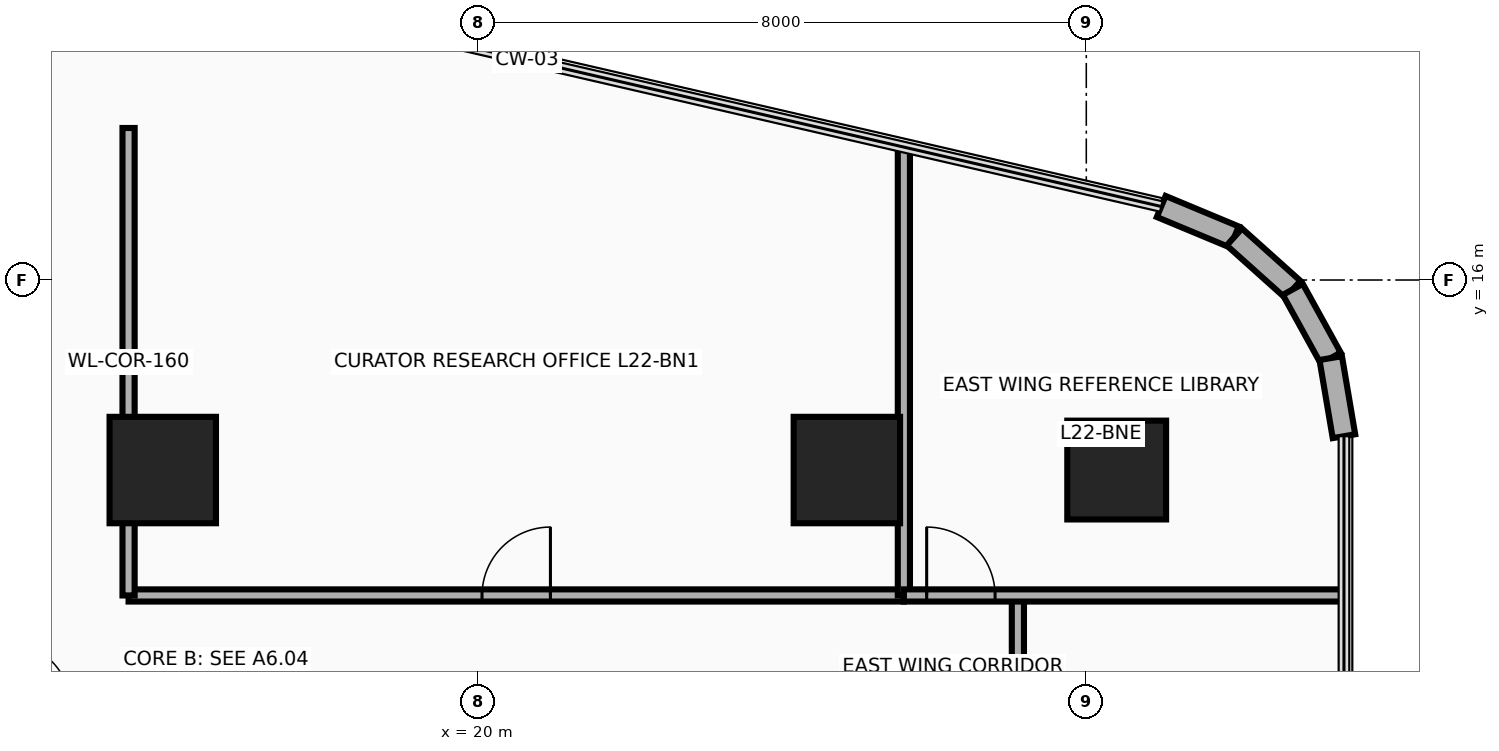
"""IFC4 building model, lengths in metres.
Left out: names, types, materials, properties, quantities, classifications, styles, units other than length and angle.
Written with IfcOpenShell. Run it as: python <this file> out.ifc"""

import sys

from ifc_helpers import new_model, si_unit, direction, frame, frame_2d, origin, origin_2d, place, context, subcontext, project, spatial, rectangle, circle, extrude, source, transform, mapped, element, fill, save


model = new_model("IFC4")
c1 = context("Model", 3, precision=1e-05, world=origin(), true_north=direction((0.0, 1.0)))
c2 = subcontext(c1, "Body", "Model", "MODEL_VIEW")
j1 = project(units=[si_unit("LENGTHUNIT", "METRE"), si_unit("PLANEANGLEUNIT", "RADIAN")], contexts=[c1])
p1 = place(None, origin())
s1 = spatial("IfcSite", under=j1, at=p1, CompositionType="ELEMENT")
p2 = place(p1, origin())
s2 = spatial("IfcBuilding", under=s1, at=p2, CompositionType="ELEMENT")
p3 = place(p2, frame((0.0, 0.0, 88.9)))
s3 = spatial("IfcBuildingStorey", under=s2, at=p3, CompositionType="ELEMENT", Elevation=88.9)
m1 = source(origin(), c2, "Body", "SweptSolid", [
    extrude(rectangle(XDim=1.4, YDim=1.4, at=origin_2d()), origin(), (0.0, 0.0, 1.0), 3.7),
])
for number, where, z_axis, x_axis in (
    (1, (15.85, 13.5, 0.0), (0.0, 0.0, 1.0), (1.0, 0.0, 0.0)),
    (2, (24.85, 13.5, 0.0), (0.0, 0.0, 1.0), (1.0, 0.0, 0.0)),
):
    element("IfcColumn", number, at=place(p3, frame(where, z_axis=z_axis, x_axis=x_axis)), inside=s3, PredefinedType="COLUMN", context=c2, shape_type="MappedRepresentation", body=[
        mapped(m1, transform((0.0, 0.0, 0.0), x_axis=(1.0, 0.0, 0.0), y_axis=(0.0, 1.0, 0.0), z_axis=(0.0, 0.0, 1.0), scale=1.0)),
    ])
m2 = source(origin(), c2, "Body", "SweptSolid", [
    extrude(circle(Radius=0.65, at=origin_2d()), origin(), (0.0, 0.0, 1.0), 3.7),
])
p4 = place(p3, frame((28.4, 13.5, 0.0), z_axis=(0.0, 0.0, 1.0), x_axis=(1.0, 0.0, 0.0)))
e3 = element("IfcColumn", 3, at=p4, inside=s3, PredefinedType="COLUMN", context=c2, shape_type="MappedRepresentation", body=[
    mapped(m2, transform((0.0, 0.0, 0.0), x_axis=(1.0, 0.0, 0.0), y_axis=(0.0, 1.0, 0.0), z_axis=(0.0, 0.0, 1.0), scale=1.0)),
])
p5 = place(p3, frame((28.986, 16.967, 0.0), z_axis=(0.0, 0.0, 1.0), x_axis=(0.923083852684, -0.384598753136, 0.0)))
e4 = element("IfcWall", 4, at=p5, inside=s3, PredefinedType="SOLIDWALL", context=c2, shape_type="SweptSolid", body=[
    extrude(rectangle(XDim=1.042, YDim=0.3, at=frame_2d((0.521, 0.0))), origin(), (0.0, 0.0, 1.0), 3.46),
])
p6 = place(p3, frame((29.948, 16.566, 0.0), z_axis=(0.0, 0.0, 1.0), x_axis=(0.744585645533, -0.66752694063, 0.0)))
e5 = element("IfcWall", 5, at=p6, inside=s3, PredefinedType="SOLIDWALL", context=c2, shape_type="SweptSolid", body=[
    extrude(rectangle(XDim=1.033, YDim=0.3, at=frame_2d((0.517, 0.0))), origin(), (0.0, 0.0, 1.0), 3.46),
])
p7 = place(p3, frame((30.717, 15.877, 0.0), z_axis=(0.0, 0.0, 1.0), x_axis=(0.482971098131, -0.875636293429, 0.0)))
e6 = element("IfcWall", 6, at=p7, inside=s3, PredefinedType="SOLIDWALL", context=c2, shape_type="SweptSolid", body=[
    extrude(rectangle(XDim=1.033, YDim=0.3, at=frame_2d((0.516, 0.0))), origin(), (0.0, 0.0, 1.0), 3.46),
])
p8 = place(p3, frame((31.216, 14.973, 0.0), z_axis=(0.0, 0.0, 1.0), x_axis=(0.167019462117, -0.985953598946, 0.0)))
e7 = element("IfcWall", 7, at=p8, inside=s3, PredefinedType="SOLIDWALL", context=c2, shape_type="SweptSolid", body=[
    extrude(rectangle(XDim=1.042, YDim=0.3, at=frame_2d((0.521, 0.0))), origin(), (0.0, 0.0, 1.0), 3.46),
])
p9 = place(p3, frame((15.4, 11.85, 0.0), z_axis=(0.0, 0.0, 1.0), x_axis=(1.0, 0.0, 0.0)))
e8 = element("IfcWall", 8, at=p9, inside=s3, PredefinedType="PARTITIONING", context=c2, shape_type="SweptSolid", body=[
    extrude(rectangle(XDim=10.2, YDim=0.16, at=frame_2d((5.1, 0.0))), origin(), (0.0, 0.0, 1.0), 2.834),
])
p10 = place(p9, frame((4.65, 0.0, 0.0)))
e9 = element("IfcOpeningElement", 9, at=p10, cuts=e8, PredefinedType="OPENING", context=c2, shape_type="SweptSolid", body=[
    extrude(rectangle(XDim=0.9, YDim=2.1, at=frame_2d((0.45, 1.05))), frame((0.0, 0.095, 0.0), z_axis=(0.0, -1.0, 0.0), x_axis=(1.0, 0.0, 0.0)), (0.0, 0.0, 1.0), 0.19),
])
p11 = place(p3, frame((15.4, 11.85, 0.0), z_axis=(0.0, 0.0, 1.0), x_axis=(0.0, 1.0, 0.0)))
e10 = element("IfcWall", 10, at=p11, inside=s3, PredefinedType="PARTITIONING", context=c2, shape_type="SweptSolid", body=[
    extrude(rectangle(XDim=6.15, YDim=0.16, at=frame_2d((3.075, 0.0))), origin(), (0.0, 0.0, 1.0), 2.583),
])
p12 = place(p3, frame((25.6, 11.85, 0.0), z_axis=(0.0, 0.0, 1.0), x_axis=(0.0, 1.0, 0.0)))
e11 = element("IfcWall", 11, at=p12, inside=s3, PredefinedType="PARTITIONING", context=c2, shape_type="SweptSolid", body=[
    extrude(rectangle(XDim=5.898, YDim=0.16, at=frame_2d((2.949, 0.0))), origin(), (0.0, 0.0, 1.0), 2.583),
])
p13 = place(p3, frame((27.1, -13.89, 0.0), z_axis=(0.0, 0.0, 1.0), x_axis=(0.0, 1.0, 0.0)))
e12 = element("IfcWall", 12, at=p13, inside=s3, PredefinedType="PARTITIONING", context=c2, shape_type="SweptSolid", body=[
    extrude(rectangle(XDim=25.74, YDim=0.16, at=frame_2d((12.87, 0.0))), origin(), (0.0, 0.0, 1.0), 2.583),
])
p14 = place(p13, frame((2.351, 0.0, 0.0)))
e13 = element("IfcOpeningElement", 13, at=p14, cuts=e12, PredefinedType="OPENING", context=c2, shape_type="SweptSolid", body=[
    extrude(rectangle(XDim=0.9, YDim=2.1, at=frame_2d((0.45, 1.05))), frame((0.0, 0.095, 0.0), z_axis=(0.0, -1.0, 0.0), x_axis=(1.0, 0.0, 0.0)), (0.0, 0.0, 1.0), 0.19),
])
p15 = place(p13, frame((8.059, 0.0, 0.0)))
e14 = element("IfcOpeningElement", 14, at=p15, cuts=e12, PredefinedType="OPENING", context=c2, shape_type="SweptSolid", body=[
    extrude(rectangle(XDim=1.8, YDim=2.15, at=frame_2d((0.9, 1.075))), frame((0.0, 0.095, 0.0), z_axis=(0.0, -1.0, 0.0), x_axis=(1.0, 0.0, 0.0)), (0.0, 0.0, 1.0), 0.19),
])
p16 = place(p13, frame((14.771, 0.0, 0.0)))
e15 = element("IfcOpeningElement", 15, at=p16, cuts=e12, PredefinedType="OPENING", context=c2, shape_type="SweptSolid", body=[
    extrude(rectangle(XDim=1.8, YDim=2.15, at=frame_2d((0.9, 1.075))), frame((0.0, 0.095, 0.0), z_axis=(0.0, -1.0, 0.0), x_axis=(1.0, 0.0, 0.0)), (0.0, 0.0, 1.0), 0.19),
])
p17 = place(p13, frame((20.788, 0.0, 0.0)))
e16 = element("IfcOpeningElement", 16, at=p17, cuts=e12, PredefinedType="OPENING", context=c2, shape_type="SweptSolid", body=[
    extrude(rectangle(XDim=1.8, YDim=2.15, at=frame_2d((0.9, 1.075))), frame((0.0, 0.095, 0.0), z_axis=(0.0, -1.0, 0.0), x_axis=(1.0, 0.0, 0.0)), (0.0, 0.0, 1.0), 0.19),
])
p18 = place(p3, frame((25.6, 11.85, 0.0), z_axis=(0.0, 0.0, 1.0), x_axis=(1.0, 0.0, 0.0)))
e17 = element("IfcWall", 17, at=p18, inside=s3, PredefinedType="PARTITIONING", context=c2, shape_type="SweptSolid", body=[
    extrude(rectangle(XDim=5.79, YDim=0.16, at=frame_2d((2.895, 0.0))), origin(), (0.0, 0.0, 1.0), 2.896),
])
p19 = place(p18, frame((0.3, 0.0, 0.0)))
e18 = element("IfcOpeningElement", 18, at=p19, cuts=e17, PredefinedType="OPENING", context=c2, shape_type="SweptSolid", body=[
    extrude(rectangle(XDim=0.9, YDim=2.1, at=frame_2d((0.45, 1.05))), frame((0.0, 0.095, 0.0), z_axis=(0.0, -1.0, 0.0), x_axis=(1.0, 0.0, 0.0)), (0.0, 0.0, 1.0), 0.19),
])
p20 = place(p10, origin())
e19 = element("IfcDoor", 19, at=p20, inside=s3, OperationType="SINGLE_SWING_RIGHT", PredefinedType="DOOR", context=c2, shape_type="SweptSolid", body=[
    extrude(rectangle(XDim=0.9, YDim=2.1, at=frame_2d((0.45, 1.05))), frame((0.0, 0.025, 0.0), z_axis=(0.0, -1.0, 0.0), x_axis=(1.0, 0.0, 0.0)), (0.0, 0.0, 1.0), 0.05),
])
fill(e9, e19)
p21 = place(p19, origin())
e20 = element("IfcDoor", 20, at=p21, inside=s3, OperationType="SINGLE_SWING_RIGHT", PredefinedType="DOOR", context=c2, shape_type="SweptSolid", body=[
    extrude(rectangle(XDim=0.9, YDim=2.1, at=frame_2d((0.45, 1.05))), frame((0.0, 0.025, 0.0), z_axis=(0.0, -1.0, 0.0), x_axis=(1.0, 0.0, 0.0)), (0.0, 0.0, 1.0), 0.05),
])
fill(e18, e20)
save(model, sys.argv[1])
